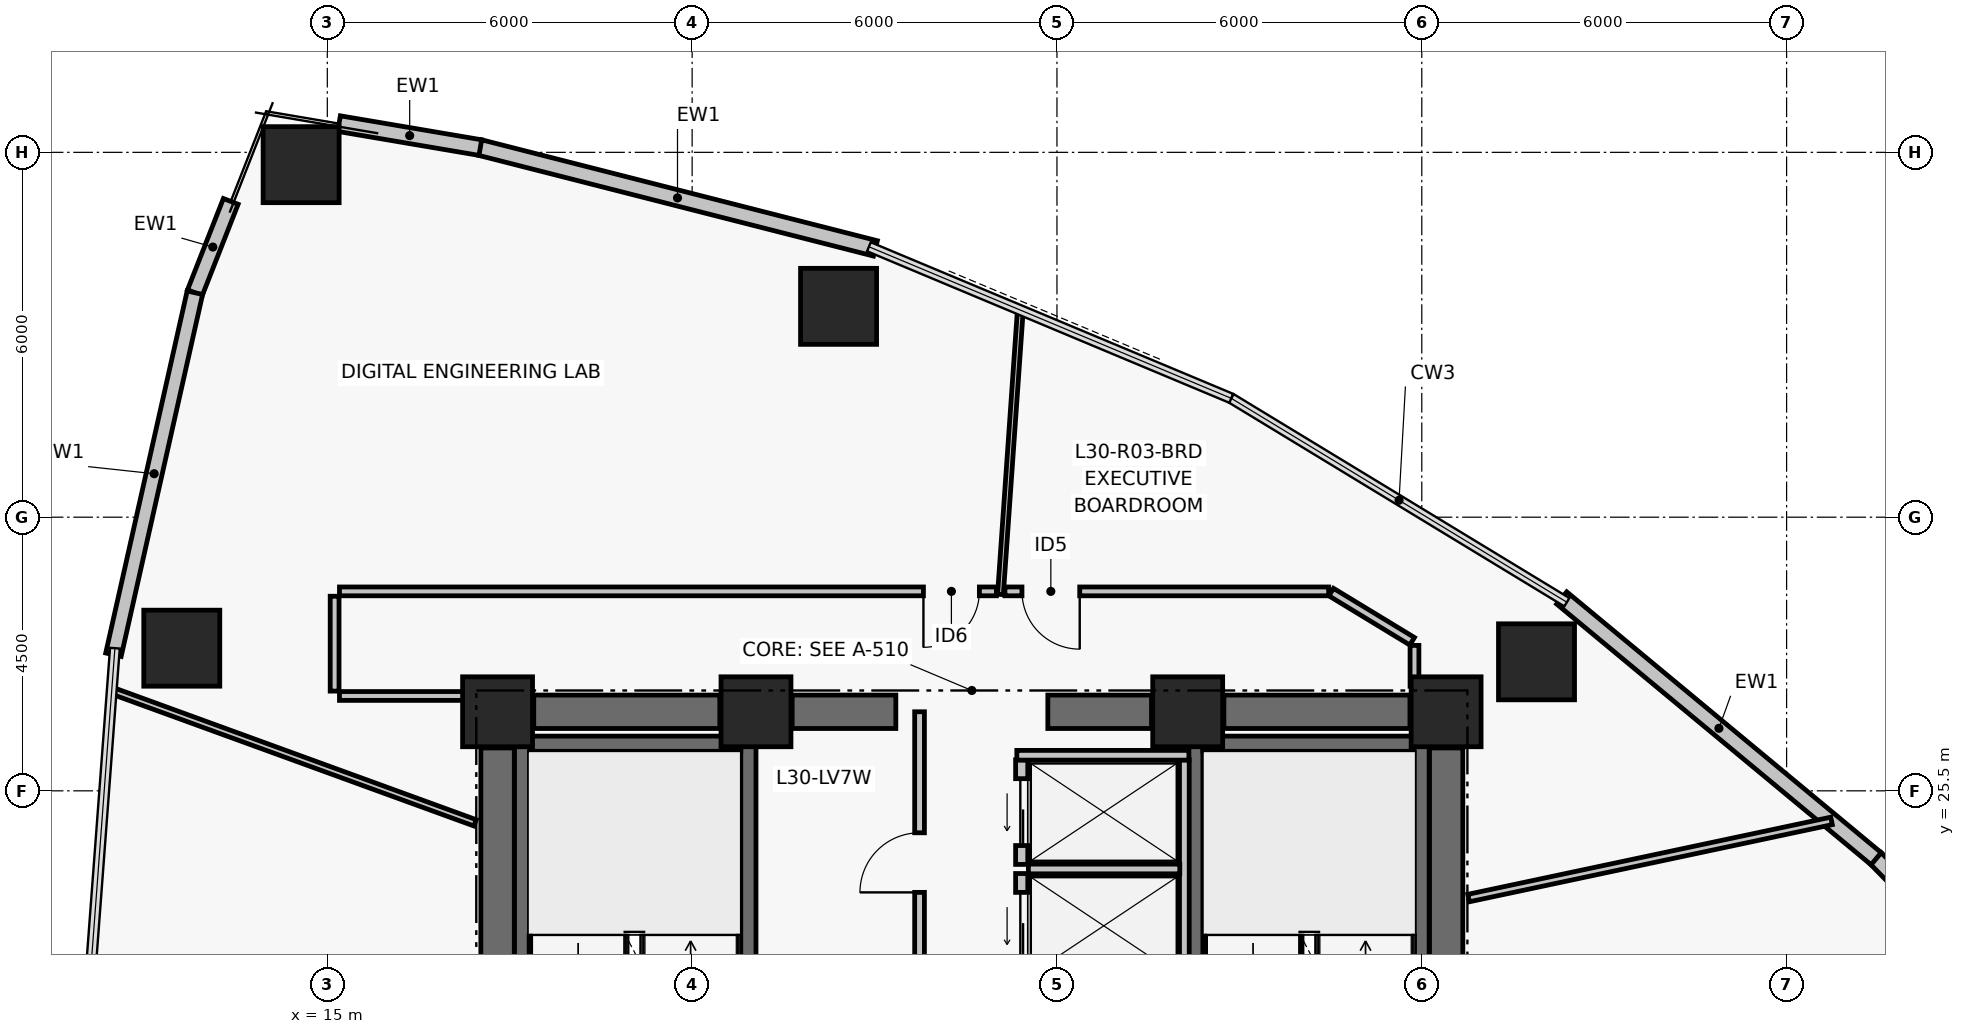
"""IFC4 building model, lengths in metres.
Left out: names, types, materials, properties, quantities, classifications, styles, units other than length and angle.
Written with IfcOpenShell. Run it as: python <this file> out.ifc"""

import sys

from ifc_helpers import new_model, si_unit, direction, frame, frame_2d, origin, origin_2d, place, context, subcontext, project, spatial, rectangle, hollow_rectangle, extrude, element, fill, save


model = new_model("IFC4")
c1 = context("Model", 3, precision=1e-05, world=origin(), true_north=direction((0.0, 1.0)))
c2 = subcontext(c1, "Body", "Model", "MODEL_VIEW")
j1 = project(units=[si_unit("LENGTHUNIT", "METRE"), si_unit("PLANEANGLEUNIT", "RADIAN")], contexts=[c1])
p1 = place(None, origin())
s1 = spatial("IfcSite", under=j1, at=p1, CompositionType="ELEMENT")
p2 = place(p1, origin())
s2 = spatial("IfcBuilding", under=s1, at=p2, CompositionType="ELEMENT")
p3 = place(p2, frame((0.0, 0.0, 122.58)))
s3 = spatial("IfcBuildingStorey", under=s2, at=p3, CompositionType="ELEMENT", Elevation=122.58)
for number, where, z_axis, x_axis in (
    (1, (17.8, 26.8, 0.0), (0.0, 0.0, 1.0), (1.0, 0.0, 0.0)),
    (2, (22.05, 26.8, 0.0), (0.0, 0.0, 1.0), (1.0, 0.0, 0.0)),
    (3, (29.15, 26.8, 0.0), (0.0, 0.0, 1.0), (1.0, 0.0, 0.0)),
    (4, (33.4, 26.8, 0.0), (0.0, 0.0, 1.0), (1.0, 0.0, 0.0)),
):
    element("IfcColumn", number, at=place(p3, frame(where, z_axis=z_axis, x_axis=x_axis)), inside=s3, PredefinedType="COLUMN", context=c2, shape_type="SweptSolid", body=[
        extrude(rectangle(XDim=1.15, YDim=1.15, at=origin_2d()), origin(), (0.0, 0.0, 1.0), 3.72),
    ])
p4 = place(p3, frame((18.395, 26.8, 0.0), z_axis=(0.0, 0.0, 1.0), x_axis=(1.0, 0.0, 0.0)))
e5 = element("IfcWall", 5, at=p4, inside=s3, PredefinedType="SHEAR", context=c2, shape_type="SweptSolid", body=[
    extrude(rectangle(XDim=3.06, YDim=0.55, at=frame_2d((1.53, 0.0))), origin(), (0.0, 0.0, 1.0), 3.47),
])
p5 = place(p3, frame((22.645, 26.8, 0.0), z_axis=(0.0, 0.0, 1.0), x_axis=(1.0, 0.0, 0.0)))
e6 = element("IfcWall", 6, at=p5, inside=s3, PredefinedType="SHEAR", context=c2, shape_type="SweptSolid", body=[
    extrude(rectangle(XDim=1.705, YDim=0.55, at=frame_2d((0.853, 0.0))), origin(), (0.0, 0.0, 1.0), 3.47),
])
p6 = place(p3, frame((26.85, 26.8, 0.0), z_axis=(0.0, 0.0, 1.0), x_axis=(1.0, 0.0, 0.0)))
e7 = element("IfcWall", 7, at=p6, inside=s3, PredefinedType="SHEAR", context=c2, shape_type="SweptSolid", body=[
    extrude(rectangle(XDim=1.705, YDim=0.55, at=frame_2d((0.853, 0.0))), origin(), (0.0, 0.0, 1.0), 3.47),
])
p7 = place(p3, frame((29.745, 26.8, 0.0), z_axis=(0.0, 0.0, 1.0), x_axis=(1.0, 0.0, 0.0)))
e8 = element("IfcWall", 8, at=p7, inside=s3, PredefinedType="SHEAR", context=c2, shape_type="SweptSolid", body=[
    extrude(rectangle(XDim=3.06, YDim=0.55, at=frame_2d((1.53, 0.0))), origin(), (0.0, 0.0, 1.0), 3.47),
])
for number, where, z_axis, x_axis in (
    (9, (17.8, 17.795, 0.0), (0.0, 0.0, 1.0), (0.0, 1.0, 0.0)),
    (10, (33.4, 17.795, 0.0), (0.0, 0.0, 1.0), (0.0, 1.0, 0.0)),
):
    element("IfcWall", number, at=place(p3, frame(where, z_axis=z_axis, x_axis=x_axis)), inside=s3, PredefinedType="SHEAR", context=c2, shape_type="SweptSolid", body=[
        extrude(rectangle(XDim=8.41, YDim=0.55, at=frame_2d((4.205, 0.0))), origin(), (0.0, 0.0, 1.0), 3.47),
    ])
p8 = place(p3, frame((18.204, 17.6, 0.0), z_axis=(0.0, 0.0, 1.0), x_axis=(0.0, 1.0, 0.0)))
e11 = element("IfcWall", 11, at=p8, inside=s3, PredefinedType="SHEAR", context=c2, shape_type="SweptSolid", body=[
    extrude(rectangle(XDim=8.8, YDim=0.25, at=frame_2d((4.4, 0.0))), origin(), (0.0, 0.0, 1.0), 3.47),
])
p9 = place(p3, frame((21.925, 17.6, 0.0), z_axis=(0.0, 0.0, 1.0), x_axis=(0.0, 1.0, 0.0)))
e12 = element("IfcWall", 12, at=p9, inside=s3, PredefinedType="SHEAR", context=c2, shape_type="SweptSolid", body=[
    extrude(rectangle(XDim=8.8, YDim=0.25, at=frame_2d((4.4, 0.0))), origin(), (0.0, 0.0, 1.0), 3.47),
])
p10 = place(p9, frame((0.35, 0.0, 0.0)))
e13 = element("IfcOpeningElement", 13, at=p10, cuts=e12, PredefinedType="OPENING", context=c2, shape_type="SweptSolid", body=[
    extrude(rectangle(XDim=1.05, YDim=2.08, at=frame_2d((0.525, 1.04))), frame((0.0, 0.135, 0.0), z_axis=(0.0, -1.0, 0.0), x_axis=(1.0, 0.0, 0.0)), (0.0, 0.0, 1.0), 0.27),
])
p11 = place(p3, frame((18.329, 26.275, 0.0), z_axis=(0.0, 0.0, 1.0), x_axis=(1.0, 0.0, 0.0)))
e14 = element("IfcWall", 14, at=p11, inside=s3, PredefinedType="SHEAR", context=c2, shape_type="SweptSolid", body=[
    extrude(rectangle(XDim=3.471, YDim=0.25, at=frame_2d((1.735, 0.0))), origin(), (0.0, 0.0, 1.0), 3.47),
])
p12 = place(p3, frame((29.275, 17.6, 0.0), z_axis=(0.0, 0.0, 1.0), x_axis=(0.0, 1.0, 0.0)))
e15 = element("IfcWall", 15, at=p12, inside=s3, PredefinedType="SHEAR", context=c2, shape_type="SweptSolid", body=[
    extrude(rectangle(XDim=8.8, YDim=0.25, at=frame_2d((4.4, 0.0))), origin(), (0.0, 0.0, 1.0), 3.47),
])
p13 = place(p12, frame((0.35, 0.0, 0.0)))
e16 = element("IfcOpeningElement", 16, at=p13, cuts=e15, PredefinedType="OPENING", context=c2, shape_type="SweptSolid", body=[
    extrude(rectangle(XDim=1.05, YDim=2.08, at=frame_2d((0.525, 1.04))), frame((0.0, 0.135, 0.0), z_axis=(0.0, -1.0, 0.0), x_axis=(1.0, 0.0, 0.0)), (0.0, 0.0, 1.0), 0.27),
])
p14 = place(p3, frame((32.996, 17.6, 0.0), z_axis=(0.0, 0.0, 1.0), x_axis=(0.0, 1.0, 0.0)))
e17 = element("IfcWall", 17, at=p14, inside=s3, PredefinedType="SHEAR", context=c2, shape_type="SweptSolid", body=[
    extrude(rectangle(XDim=8.8, YDim=0.25, at=frame_2d((4.4, 0.0))), origin(), (0.0, 0.0, 1.0), 3.47),
])
p15 = place(p3, frame((29.4, 26.275, 0.0), z_axis=(0.0, 0.0, 1.0), x_axis=(1.0, 0.0, 0.0)))
e18 = element("IfcWall", 18, at=p15, inside=s3, PredefinedType="SHEAR", context=c2, shape_type="SweptSolid", body=[
    extrude(rectangle(XDim=3.471, YDim=0.25, at=frame_2d((1.736, 0.0))), origin(), (0.0, 0.0, 1.0), 3.47),
])
for number, where, z_axis, x_axis in (
    (19, (34.887, 27.622, 0.0), (0.0, 0.0, 1.0), (1.0, 0.0, 0.0)),
    (20, (23.408, 33.467, 0.0), (0.0, 0.0, 1.0), (1.0, 0.0, 0.0)),
    (21, (14.569, 35.797, 0.0), (0.0, 0.0, 1.0), (1.0, 0.0, 0.0)),
    (22, (12.607, 27.846, 0.0), (0.0, 0.0, 1.0), (1.0, 0.0, 0.0)),
):
    element("IfcColumn", number, at=place(p3, frame(where, z_axis=z_axis, x_axis=x_axis)), inside=s3, PredefinedType="COLUMN", context=c2, shape_type="SweptSolid", body=[
        extrude(hollow_rectangle(XDim=1.25, YDim=1.25, WallThickness=0.05, at=origin_2d()), origin(), (0.0, 0.0, 1.0), 3.72),
    ])
p16 = place(p3, frame((40.463, 24.392, 0.0), z_axis=(0.0, 0.0, 1.0), x_axis=(0.700603293449, -0.713550996922, 0.0)))
e23 = element("IfcWall", 23, at=p16, inside=s3, PredefinedType="PARTITIONING", context=c2, shape_type="SweptSolid", body=[
    extrude(rectangle(XDim=2.395, YDim=0.26, at=frame_2d((1.197, 0.0))), origin(), (0.0, 0.0, 1.0), 3.47),
])
p17 = place(p3, frame((35.301, 28.672, 0.0), z_axis=(0.0, 0.0, 1.0), x_axis=(0.76975316947, -0.638341646841, 0.0)))
e24 = element("IfcWall", 24, at=p17, inside=s3, PredefinedType="PARTITIONING", context=c2, shape_type="SweptSolid", body=[
    extrude(rectangle(XDim=6.718, YDim=0.26, at=frame_2d((3.359, 0.0))), origin(), (0.0, 0.0, 1.0), 3.47),
])
p18 = place(p3, frame((17.505, 36.081, 0.0), z_axis=(0.0, 0.0, 1.0), x_axis=(0.968981437296, -0.247133514876, 0.0)))
e25 = element("IfcWall", 25, at=p18, inside=s3, PredefinedType="PARTITIONING", context=c2, shape_type="SweptSolid", body=[
    extrude(rectangle(XDim=6.718, YDim=0.26, at=frame_2d((3.359, 0.0))), origin(), (0.0, 0.0, 1.0), 3.47),
])
p19 = place(p3, frame((15.193, 36.472, 0.0), z_axis=(0.0, 0.0, 1.0), x_axis=(0.985905269947, -0.167304508875, 0.0)))
e26 = element("IfcWall", 26, at=p19, inside=s3, PredefinedType="PARTITIONING", context=c2, shape_type="SweptSolid", body=[
    extrude(rectangle(XDim=2.357, YDim=0.26, at=frame_2d((1.178, 0.0))), origin(), (0.0, 0.0, 1.0), 3.47),
])
p20 = place(p3, frame((12.822, 33.691, 0.0), z_axis=(0.0, 0.0, 1.0), x_axis=(0.365488551504, 0.930815835018, 0.0)))
e27 = element("IfcWall", 27, at=p20, inside=s3, PredefinedType="PARTITIONING", context=c2, shape_type="SweptSolid", body=[
    extrude(rectangle(XDim=1.614, YDim=0.26, at=frame_2d((0.807, 0.0))), origin(), (0.0, 0.0, 1.0), 3.47),
])
p21 = place(p3, frame((11.482, 27.738, 0.0), z_axis=(0.0, 0.0, 1.0), x_axis=(0.219535044336, 0.975604614743, 0.0)))
e28 = element("IfcWall", 28, at=p21, inside=s3, PredefinedType="PARTITIONING", context=c2, shape_type="SweptSolid", body=[
    extrude(rectangle(XDim=6.102, YDim=0.26, at=frame_2d((3.051, 0.0))), origin(), (0.0, 0.0, 1.0), 3.47),
])
p22 = place(p3, frame((26.42, 22.42, 0.0), z_axis=(0.0, 0.0, 1.0), x_axis=(0.0, 1.0, 0.0)))
e29 = element("IfcWall", 29, at=p22, inside=s3, PredefinedType="PARTITIONING", context=c2, shape_type="SweptSolid", body=[
    extrude(rectangle(XDim=1.72, YDim=0.2, at=frame_2d((0.86, 0.0))), origin(), (0.0, 0.0, 1.0), 3.47),
])
p23 = place(p22, frame((0.31, 0.0, 0.0)))
e30 = element("IfcOpeningElement", 30, at=p23, cuts=e29, PredefinedType="OPENING", context=c2, shape_type="SweptSolid", body=[
    extrude(rectangle(XDim=1.1, YDim=2.08, at=frame_2d((0.55, 1.04))), frame((0.0, 0.11, 0.0), z_axis=(0.0, -1.0, 0.0), x_axis=(1.0, 0.0, 0.0)), (0.0, 0.0, 1.0), 0.22),
])
p24 = place(p3, frame((26.42, 24.29, 0.0), z_axis=(0.0, 0.0, 1.0), x_axis=(0.0, 1.0, 0.0)))
e31 = element("IfcWall", 31, at=p24, inside=s3, PredefinedType="PARTITIONING", context=c2, shape_type="SweptSolid", body=[
    extrude(rectangle(XDim=1.72, YDim=0.2, at=frame_2d((0.86, 0.0))), origin(), (0.0, 0.0, 1.0), 3.47),
])
p25 = place(p24, frame((0.31, 0.0, 0.0)))
e32 = element("IfcOpeningElement", 32, at=p25, cuts=e31, PredefinedType="OPENING", context=c2, shape_type="SweptSolid", body=[
    extrude(rectangle(XDim=1.1, YDim=2.08, at=frame_2d((0.55, 1.04))), frame((0.0, 0.11, 0.0), z_axis=(0.0, -1.0, 0.0), x_axis=(1.0, 0.0, 0.0)), (0.0, 0.0, 1.0), 0.22),
])
p26 = place(p3, frame((29.095, 20.56, 0.0), z_axis=(0.0, 0.0, 1.0), x_axis=(0.0, 1.0, 0.0)))
e33 = element("IfcWall", 33, at=p26, inside=s3, PredefinedType="PARTITIONING", context=c2, shape_type="SweptSolid", body=[
    extrude(rectangle(XDim=5.45, YDim=0.16, at=frame_2d((2.725, 0.0))), origin(), (0.0, 0.0, 1.0), 3.47),
])
p27 = place(p3, frame((26.53, 24.215, 0.0), z_axis=(0.0, 0.0, 1.0), x_axis=(1.0, 0.0, 0.0)))
e34 = element("IfcWall", 34, at=p27, inside=s3, PredefinedType="PARTITIONING", context=c2, shape_type="SweptSolid", body=[
    extrude(rectangle(XDim=2.49, YDim=0.16, at=frame_2d((1.245, 0.0))), origin(), (0.0, 0.0, 1.0), 3.47),
])
p28 = place(p3, frame((26.34, 26.085, 0.0), z_axis=(0.0, 0.0, 1.0), x_axis=(1.0, 0.0, 0.0)))
e35 = element("IfcWall", 35, at=p28, inside=s3, PredefinedType="PARTITIONING", context=c2, shape_type="SweptSolid", body=[
    extrude(rectangle(XDim=2.83, YDim=0.16, at=frame_2d((1.415, 0.0))), origin(), (0.0, 0.0, 1.0), 3.47),
])
p29 = place(p3, frame((24.74, 22.43, 0.0), z_axis=(0.0, 0.0, 1.0), x_axis=(0.0, 1.0, 0.0)))
e36 = element("IfcWall", 36, at=p29, inside=s3, PredefinedType="PARTITIONING", context=c2, shape_type="SweptSolid", body=[
    extrude(rectangle(XDim=4.37, YDim=0.16, at=frame_2d((2.185, 0.0))), origin(), (0.0, 0.0, 1.0), 2.6),
])
p30 = place(p29, frame((1.4, 0.0, 0.0)))
e37 = element("IfcOpeningElement", 37, at=p30, cuts=e36, PredefinedType="OPENING", context=c2, shape_type="SweptSolid", body=[
    extrude(rectangle(XDim=0.98, YDim=2.06, at=frame_2d((0.49, 1.03))), frame((0.0, 0.09, 0.0), z_axis=(0.0, -1.0, 0.0), x_axis=(1.0, 0.0, 0.0)), (0.0, 0.0, 1.0), 0.18),
])
p31 = place(p3, frame((33.74, 27.22, 0.0), z_axis=(0.0, 0.0, 1.0), x_axis=(-1.0, 0.0, 0.0)))
e38 = element("IfcWall", 38, at=p31, inside=s3, PredefinedType="PARTITIONING", context=c2, shape_type="SweptSolid", body=[
    extrude(rectangle(XDim=0.86, YDim=0.145, at=frame_2d((0.43, 0.0))), origin(), (0.0, 0.0, 1.0), 2.6),
])
p32 = place(p3, frame((32.88, 27.22, 0.0), z_axis=(0.0, 0.0, 1.0), x_axis=(0.0, 1.0, 0.0)))
e39 = element("IfcWall", 39, at=p32, inside=s3, PredefinedType="PARTITIONING", context=c2, shape_type="SweptSolid", body=[
    extrude(rectangle(XDim=0.671, YDim=0.145, at=frame_2d((0.335, 0.0))), origin(), (0.0, 0.0, 1.0), 2.6),
])
p33 = place(p3, frame((32.842, 27.96, 0.0), z_axis=(0.0, 0.0, 1.0), x_axis=(-0.854742818792, 0.519051744745, 0.0)))
e40 = element("IfcWall", 40, at=p33, inside=s3, PredefinedType="PARTITIONING", context=c2, shape_type="SweptSolid", body=[
    extrude(rectangle(XDim=1.558, YDim=0.145, at=frame_2d((0.779, 0.0))), origin(), (0.0, 0.0, 1.0), 3.05),
])
p34 = place(p3, frame((31.469, 28.78, 0.0), z_axis=(0.0, 0.0, 1.0), x_axis=(-1.0, 0.0, 0.0)))
e41 = element("IfcWall", 41, at=p34, inside=s3, PredefinedType="PARTITIONING", context=c2, shape_type="SweptSolid", body=[
    extrude(rectangle(XDim=5.324, YDim=0.145, at=frame_2d((2.662, 0.0))), origin(), (0.0, 0.0, 1.0), 3.05),
])
p35 = place(p34, frame((4.094, 0.0, 0.0)))
e42 = element("IfcOpeningElement", 42, at=p35, cuts=e41, PredefinedType="OPENING", context=c2, shape_type="SweptSolid", body=[
    extrude(rectangle(XDim=0.95, YDim=2.06, at=frame_2d((0.475, 1.03))), frame((0.0, 0.083, 0.0), z_axis=(0.0, -1.0, 0.0), x_axis=(1.0, 0.0, 0.0)), (0.0, 0.0, 1.0), 0.165),
])
p36 = place(p3, frame((26.004, 28.78, 0.0), z_axis=(0.0, 0.0, 1.0), x_axis=(-1.0, 0.0, 0.0)))
e43 = element("IfcWall", 43, at=p36, inside=s3, PredefinedType="PARTITIONING", context=c2, shape_type="SweptSolid", body=[
    extrude(rectangle(XDim=10.804, YDim=0.145, at=frame_2d((5.402, 0.0))), origin(), (0.0, 0.0, 1.0), 2.65),
])
p37 = place(p36, frame((0.28, 0.0, 0.0)))
e44 = element("IfcOpeningElement", 44, at=p37, cuts=e43, PredefinedType="OPENING", context=c2, shape_type="SweptSolid", body=[
    extrude(rectangle(XDim=0.92, YDim=2.05, at=frame_2d((0.46, 1.025))), frame((0.0, 0.083, 0.0), z_axis=(0.0, -1.0, 0.0), x_axis=(1.0, 0.0, 0.0)), (0.0, 0.0, 1.0), 0.165),
])
p38 = place(p3, frame((15.12, 28.7, 0.0), z_axis=(0.0, 0.0, 1.0), x_axis=(0.0, -1.0, 0.0)))
e45 = element("IfcWall", 45, at=p38, inside=s3, PredefinedType="PARTITIONING", context=c2, shape_type="SweptSolid", body=[
    extrude(rectangle(XDim=1.56, YDim=0.145, at=frame_2d((0.78, 0.0))), origin(), (0.0, 0.0, 1.0), 2.65),
])
p39 = place(p3, frame((15.2, 27.06, 0.0), z_axis=(0.0, 0.0, 1.0), x_axis=(1.0, 0.0, 0.0)))
e46 = element("IfcWall", 46, at=p39, inside=s3, PredefinedType="PARTITIONING", context=c2, shape_type="SweptSolid", body=[
    extrude(rectangle(XDim=2.18, YDim=0.145, at=frame_2d((1.09, 0.0))), origin(), (0.0, 0.0, 1.0), 2.65),
])
p40 = place(p3, frame((33.77, 23.737, 0.0), z_axis=(0.0, 0.0, 1.0), x_axis=(0.978144206175, 0.20792766032, 0.0)))
e47 = element("IfcWall", 47, at=p40, inside=s3, PredefinedType="PARTITIONING", context=c2, shape_type="SweptSolid", body=[
    extrude(rectangle(XDim=6.102, YDim=0.125, at=frame_2d((3.051, 0.0))), origin(), (0.0, 0.0, 1.0), 2.6),
])
p41 = place(p3, frame((26.071, 28.73, 0.0), z_axis=(0.0, 0.0, 1.0), x_axis=(0.069740179431, 0.997565189535, 0.0)))
e48 = element("IfcWall", 48, at=p41, inside=s3, PredefinedType="PARTITIONING", context=c2, shape_type="SweptSolid", body=[
    extrude(rectangle(XDim=4.698, YDim=0.095, at=frame_2d((2.349, 0.0))), origin(), (0.0, 0.0, 1.0), 2.9),
])
p42 = place(p3, frame((17.43, 24.974, 0.0), z_axis=(0.0, 0.0, 1.0), x_axis=(-0.939693782006, 0.342016952882, 0.0)))
e49 = element("IfcWall", 49, at=p42, inside=s3, PredefinedType="PARTITIONING", context=c2, shape_type="SweptSolid", body=[
    extrude(rectangle(XDim=6.369, YDim=0.11, at=frame_2d((3.185, 0.0))), origin(), (0.0, 0.0, 1.0), 2.6),
])
p43 = place(p23, origin())
e50 = element("IfcDoor", 50, at=p43, inside=s3, OperationType="DOUBLE_DOOR_SLIDING", PredefinedType="DOOR", context=c2, shape_type="SweptSolid", body=[
    extrude(rectangle(XDim=1.1, YDim=2.08, at=frame_2d((0.55, 1.04))), frame((0.0, 0.025, 0.0), z_axis=(0.0, -1.0, 0.0), x_axis=(1.0, 0.0, 0.0)), (0.0, 0.0, 1.0), 0.05),
])
fill(e30, e50)
p44 = place(p25, origin())
e51 = element("IfcDoor", 51, at=p44, inside=s3, OperationType="DOUBLE_DOOR_SLIDING", PredefinedType="DOOR", context=c2, shape_type="SweptSolid", body=[
    extrude(rectangle(XDim=1.1, YDim=2.08, at=frame_2d((0.55, 1.04))), frame((0.0, 0.025, 0.0), z_axis=(0.0, -1.0, 0.0), x_axis=(1.0, 0.0, 0.0)), (0.0, 0.0, 1.0), 0.05),
])
fill(e32, e51)
p45 = place(p30, origin())
e52 = element("IfcDoor", 52, at=p45, inside=s3, OperationType="SINGLE_SWING_LEFT", PredefinedType="DOOR", context=c2, shape_type="SweptSolid", body=[
    extrude(rectangle(XDim=0.98, YDim=2.06, at=frame_2d((0.49, 1.03))), frame((0.0, 0.025, 0.0), z_axis=(0.0, -1.0, 0.0), x_axis=(1.0, 0.0, 0.0)), (0.0, 0.0, 1.0), 0.05),
])
fill(e37, e52)
p46 = place(p35, origin())
e53 = element("IfcDoor", 53, at=p46, inside=s3, OperationType="SINGLE_SWING_LEFT", PredefinedType="DOOR", context=c2, shape_type="SweptSolid", body=[
    extrude(rectangle(XDim=0.95, YDim=2.06, at=frame_2d((0.475, 1.03))), frame((0.0, 0.025, 0.0), z_axis=(0.0, -1.0, 0.0), x_axis=(1.0, 0.0, 0.0)), (0.0, 0.0, 1.0), 0.05),
])
fill(e42, e53)
p47 = place(p37, origin())
e54 = element("IfcDoor", 54, at=p47, inside=s3, OperationType="SINGLE_SWING_RIGHT", PredefinedType="DOOR", context=c2, shape_type="SweptSolid", body=[
    extrude(rectangle(XDim=0.92, YDim=2.05, at=frame_2d((0.46, 1.025))), frame((0.0, 0.025, 0.0), z_axis=(0.0, -1.0, 0.0), x_axis=(1.0, 0.0, 0.0)), (0.0, 0.0, 1.0), 0.05),
])
fill(e44, e54)
save(model, sys.argv[1])
